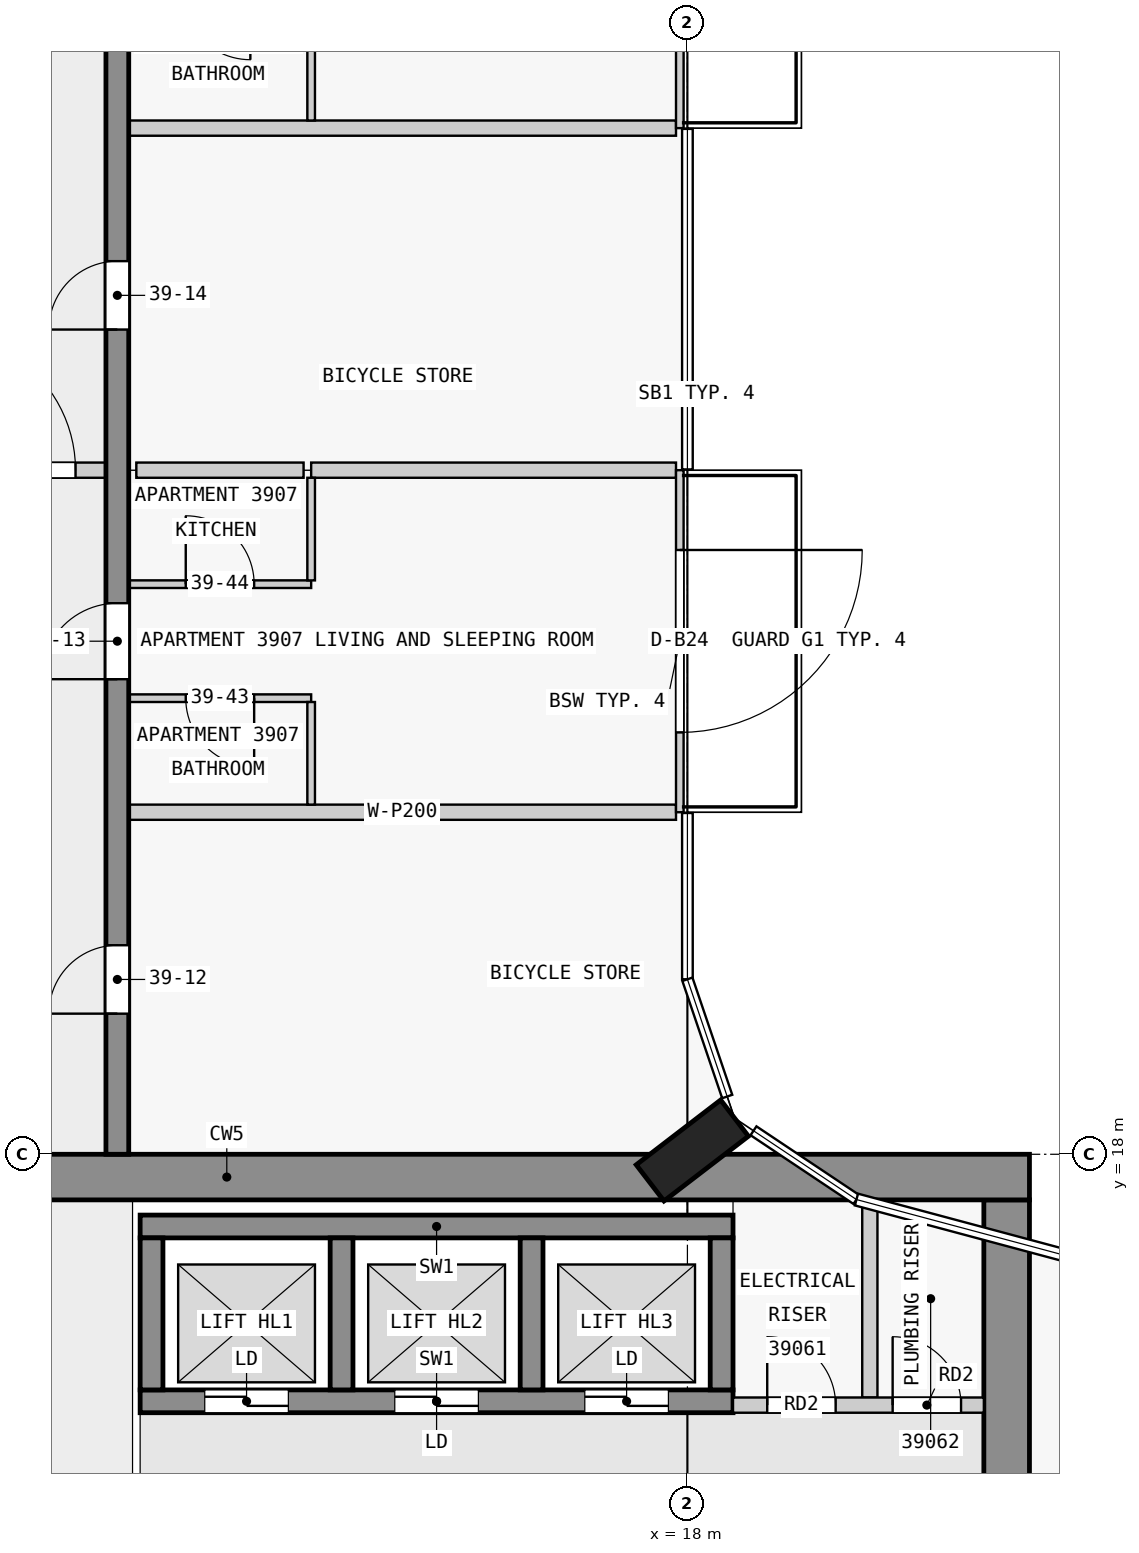
"""IFC4 building model, lengths in metres.
Left out: names, types, materials, properties, quantities, classifications, styles, units other than length and angle.
Written with IfcOpenShell. Run it as: python <this file> out.ifc"""

import sys

from ifc_helpers import new_model, si_unit, direction, frame, frame_2d, origin, origin_2d, place, context, subcontext, project, spatial, rectangle, extrude, element, fill, save


model = new_model("IFC4")
c1 = context("Model", 3, precision=1e-05, world=origin(), true_north=direction((0.0, 1.0)))
c2 = subcontext(c1, "Body", "Model", "MODEL_VIEW")
j1 = project(units=[si_unit("LENGTHUNIT", "METRE"), si_unit("PLANEANGLEUNIT", "RADIAN")], contexts=[c1])
p1 = place(None, origin())
s1 = spatial("IfcSite", under=j1, at=p1, CompositionType="ELEMENT")
p2 = place(p1, origin())
s2 = spatial("IfcBuilding", under=s1, at=p2, CompositionType="ELEMENT")
p3 = place(p2, frame((0.0, 0.0, 153.4)))
s3 = spatial("IfcBuildingStorey", under=s2, at=p3, CompositionType="ELEMENT", Elevation=153.4)
p4 = place(p3, frame((18.065, 18.05, 0.0), z_axis=(0.0, 0.0, 1.0), x_axis=(-0.608810846443, 0.793315418515, 0.0)))
e1 = element("IfcColumn", 1, at=p4, inside=s3, PredefinedType="COLUMN", context=c2, shape_type="SweptSolid", body=[
    extrude(rectangle(XDim=0.6, YDim=1.4, at=origin_2d()), origin(), (0.0, 0.0, 1.0), 3.5),
])
p5 = place(p3, frame((1.38, 17.7, 0.0), z_axis=(0.0, 0.0, 1.0), x_axis=(1.0, 0.0, 0.0)))
e2 = element("IfcWall", 2, at=p5, inside=s3, PredefinedType="SHEAR", context=c2, shape_type="SweptSolid", body=[
    extrude(rectangle(XDim=21.12, YDim=0.6, at=frame_2d((10.56, 0.0))), origin(), (0.0, 0.0, 1.0), 3.25),
])
p6 = place(p5, frame((6.4, 0.0, 0.0)))
e3 = element("IfcOpeningElement", 3, at=p6, cuts=e2, PredefinedType="OPENING", context=c2, shape_type="SweptSolid", body=[
    extrude(rectangle(XDim=1.8, YDim=2.1, at=frame_2d((0.9, 1.05))), frame((0.0, 0.31, 0.0), z_axis=(0.0, -1.0, 0.0), x_axis=(1.0, 0.0, 0.0)), (0.0, 0.0, 1.0), 0.62),
])
p7 = place(p3, frame((22.2, 2.5, 0.0), z_axis=(0.0, 0.0, 1.0), x_axis=(0.0, 1.0, 0.0)))
e4 = element("IfcWall", 4, at=p7, inside=s3, PredefinedType="SHEAR", context=c2, shape_type="SweptSolid", body=[
    extrude(rectangle(XDim=14.9, YDim=0.6, at=frame_2d((7.45, 0.0))), origin(), (0.0, 0.0, 1.0), 3.25),
])
p8 = place(p7, frame((5.6, 0.0, 0.0)))
e5 = element("IfcOpeningElement", 5, at=p8, cuts=e4, PredefinedType="OPENING", context=c2, shape_type="SweptSolid", body=[
    extrude(rectangle(XDim=1.8, YDim=2.1, at=frame_2d((0.9, 1.05))), frame((0.0, 0.31, 0.0), z_axis=(0.0, -1.0, 0.0), x_axis=(1.0, 0.0, 0.0)), (0.0, 0.0, 1.0), 0.62),
])
p9 = place(p3, frame((10.8, 17.05, 0.0), z_axis=(0.0, 0.0, 1.0), x_axis=(1.0, 0.0, 0.0)))
e6 = element("IfcWall", 6, at=p9, inside=s3, PredefinedType="SHEAR", context=c2, shape_type="SweptSolid", body=[
    extrude(rectangle(XDim=7.8, YDim=0.3, at=frame_2d((3.9, 0.0))), origin(), (0.0, 0.0, 1.0), 3.25),
])
p10 = place(p3, frame((10.8, 14.75, 0.0), z_axis=(0.0, 0.0, 1.0), x_axis=(1.0, 0.0, 0.0)))
e7 = element("IfcWall", 7, at=p10, inside=s3, PredefinedType="SHEAR", context=c2, shape_type="SweptSolid", body=[
    extrude(rectangle(XDim=7.8, YDim=0.3, at=frame_2d((3.9, 0.0))), origin(), (0.0, 0.0, 1.0), 3.25),
])
p11 = place(p10, frame((0.85, 0.0, 0.0)))
e8 = element("IfcOpeningElement", 8, at=p11, cuts=e7, PredefinedType="OPENING", context=c2, shape_type="SweptSolid", body=[
    extrude(rectangle(XDim=1.1, YDim=2.1, at=frame_2d((0.55, 1.05))), frame((0.0, 0.16, 0.0), z_axis=(0.0, -1.0, 0.0), x_axis=(1.0, 0.0, 0.0)), (0.0, 0.0, 1.0), 0.32),
])
p12 = place(p10, frame((3.35, 0.0, 0.0)))
e9 = element("IfcOpeningElement", 9, at=p12, cuts=e7, PredefinedType="OPENING", context=c2, shape_type="SweptSolid", body=[
    extrude(rectangle(XDim=1.1, YDim=2.1, at=frame_2d((0.55, 1.05))), frame((0.0, 0.16, 0.0), z_axis=(0.0, -1.0, 0.0), x_axis=(1.0, 0.0, 0.0)), (0.0, 0.0, 1.0), 0.32),
])
p13 = place(p10, frame((5.85, 0.0, 0.0)))
e10 = element("IfcOpeningElement", 10, at=p13, cuts=e7, PredefinedType="OPENING", context=c2, shape_type="SweptSolid", body=[
    extrude(rectangle(XDim=1.1, YDim=2.1, at=frame_2d((0.55, 1.05))), frame((0.0, 0.16, 0.0), z_axis=(0.0, -1.0, 0.0), x_axis=(1.0, 0.0, 0.0)), (0.0, 0.0, 1.0), 0.32),
])
for number, where, z_axis, x_axis in (
    (11, (10.95, 14.9, 0.0), (0.0, 0.0, 1.0), (0.0, 1.0, 0.0)),
    (12, (13.45, 14.9, 0.0), (0.0, 0.0, 1.0), (0.0, 1.0, 0.0)),
    (13, (15.95, 14.9, 0.0), (0.0, 0.0, 1.0), (0.0, 1.0, 0.0)),
    (14, (18.45, 14.9, 0.0), (0.0, 0.0, 1.0), (0.0, 1.0, 0.0)),
):
    element("IfcWall", number, at=place(p3, frame(where, z_axis=z_axis, x_axis=x_axis)), inside=s3, PredefinedType="SHEAR", context=c2, shape_type="SweptSolid", body=[
        extrude(rectangle(XDim=2.0, YDim=0.3, at=frame_2d((1.0, 0.0))), origin(), (0.0, 0.0, 1.0), 3.25),
    ])
p14 = place(p3, frame((10.5, 18.0, 0.0), z_axis=(0.0, 0.0, 1.0), x_axis=(0.0, 1.0, 0.0)))
e15 = element("IfcWall", 15, at=p14, inside=s3, PredefinedType="SHEAR", context=c2, shape_type="SweptSolid", body=[
    extrude(rectangle(XDim=27.0, YDim=0.3, at=frame_2d((13.5, 0.0))), origin(), (0.0, 0.0, 1.0), 3.25),
])
p15 = place(p14, frame((1.85, 0.0, 0.0)))
e16 = element("IfcOpeningElement", 16, at=p15, cuts=e15, PredefinedType="OPENING", context=c2, shape_type="SweptSolid", body=[
    extrude(rectangle(XDim=0.9, YDim=2.1, at=frame_2d((0.45, 1.05))), frame((0.0, 0.16, 0.0), z_axis=(0.0, -1.0, 0.0), x_axis=(1.0, 0.0, 0.0)), (0.0, 0.0, 1.0), 0.32),
])
p16 = place(p14, frame((6.25, 0.0, 0.0)))
e17 = element("IfcOpeningElement", 17, at=p16, cuts=e15, PredefinedType="OPENING", context=c2, shape_type="SweptSolid", body=[
    extrude(rectangle(XDim=1.0, YDim=2.1, at=frame_2d((0.5, 1.05))), frame((0.0, 0.16, 0.0), z_axis=(0.0, -1.0, 0.0), x_axis=(1.0, 0.0, 0.0)), (0.0, 0.0, 1.0), 0.32),
])
p17 = place(p14, frame((10.85, 0.0, 0.0)))
e18 = element("IfcOpeningElement", 18, at=p17, cuts=e15, PredefinedType="OPENING", context=c2, shape_type="SweptSolid", body=[
    extrude(rectangle(XDim=0.9, YDim=2.1, at=frame_2d((0.45, 1.05))), frame((0.0, 0.16, 0.0), z_axis=(0.0, -1.0, 0.0), x_axis=(1.0, 0.0, 0.0)), (0.0, 0.0, 1.0), 0.32),
])
p18 = place(p14, frame((17.55, 0.0, 0.0)))
e19 = element("IfcOpeningElement", 19, at=p18, cuts=e15, PredefinedType="OPENING", context=c2, shape_type="SweptSolid", body=[
    extrude(rectangle(XDim=1.0, YDim=2.1, at=frame_2d((0.5, 1.05))), frame((0.0, 0.16, 0.0), z_axis=(0.0, -1.0, 0.0), x_axis=(1.0, 0.0, 0.0)), (0.0, 0.0, 1.0), 0.32),
])
p19 = place(p14, frame((23.25, 0.0, 0.0)))
e20 = element("IfcOpeningElement", 20, at=p19, cuts=e15, PredefinedType="OPENING", context=c2, shape_type="SweptSolid", body=[
    extrude(rectangle(XDim=0.9, YDim=2.1, at=frame_2d((0.45, 1.05))), frame((0.0, 0.16, 0.0), z_axis=(0.0, -1.0, 0.0), x_axis=(1.0, 0.0, 0.0)), (0.0, 0.0, 1.0), 0.32),
])
p20 = place(p14, frame((25.45, 0.0, 0.0)))
e21 = element("IfcOpeningElement", 21, at=p20, cuts=e15, PredefinedType="OPENING", context=c2, shape_type="SweptSolid", body=[
    extrude(rectangle(XDim=1.0, YDim=2.1, at=frame_2d((0.5, 1.05))), frame((0.0, 0.16, 0.0), z_axis=(0.0, -1.0, 0.0), x_axis=(1.0, 0.0, 0.0)), (0.0, 0.0, 1.0), 0.32),
])
p21 = place(p3, frame((17.9, 27.0, 0.0), z_axis=(0.0, 0.0, 1.0), x_axis=(0.0, -1.0, 0.0)))
e22 = element("IfcWall", 22, at=p21, inside=s3, PredefinedType="STANDARD", context=c2, shape_type="SweptSolid", body=[
    extrude(rectangle(XDim=4.5, YDim=0.1, at=frame_2d((2.25, 0.0))), origin(), (0.0, 0.0, 1.0), 3.25),
])
p22 = place(p21, frame((1.05, 0.0, 0.0)))
e23 = element("IfcOpeningElement", 23, at=p22, cuts=e22, PredefinedType="OPENING", context=c2, shape_type="SweptSolid", body=[
    extrude(rectangle(XDim=2.4, YDim=2.4, at=frame_2d((1.2, 1.2))), frame((0.0, 0.06, 0.0), z_axis=(0.0, -1.0, 0.0), x_axis=(1.0, 0.0, 0.0)), (0.0, 0.0, 1.0), 0.12),
])
p23 = place(p3, frame((17.9, 36.0, 0.0), z_axis=(0.0, 0.0, 1.0), x_axis=(0.0, -1.0, 0.0)))
e24 = element("IfcWall", 24, at=p23, inside=s3, PredefinedType="STANDARD", context=c2, shape_type="SweptSolid", body=[
    extrude(rectangle(XDim=4.5, YDim=0.1, at=frame_2d((2.25, 0.0))), origin(), (0.0, 0.0, 1.0), 3.25),
])
p24 = place(p23, frame((1.05, 0.0, 0.0)))
e25 = element("IfcOpeningElement", 25, at=p24, cuts=e24, PredefinedType="OPENING", context=c2, shape_type="SweptSolid", body=[
    extrude(rectangle(XDim=2.4, YDim=2.4, at=frame_2d((1.2, 1.2))), frame((0.0, 0.06, 0.0), z_axis=(0.0, -1.0, 0.0), x_axis=(1.0, 0.0, 0.0)), (0.0, 0.0, 1.0), 0.12),
])
p25 = place(p3, frame((18.6, 14.7, 0.0), z_axis=(0.0, 0.0, 1.0), x_axis=(1.0, 0.0, 0.0)))
e26 = element("IfcWall", 26, at=p25, inside=s3, PredefinedType="PARTITIONING", context=c2, shape_type="SweptSolid", body=[
    extrude(rectangle(XDim=3.3, YDim=0.2, at=frame_2d((1.65, 0.0))), origin(), (0.0, 0.0, 1.0), 3.25),
])
p26 = place(p25, frame((0.45, 0.0, 0.0)))
e27 = element("IfcOpeningElement", 27, at=p26, cuts=e26, PredefinedType="OPENING", context=c2, shape_type="SweptSolid", body=[
    extrude(rectangle(XDim=0.9, YDim=2.1, at=frame_2d((0.45, 1.05))), frame((0.0, 0.11, 0.0), z_axis=(0.0, -1.0, 0.0), x_axis=(1.0, 0.0, 0.0)), (0.0, 0.0, 1.0), 0.22),
])
p27 = place(p25, frame((2.1, 0.0, 0.0)))
e28 = element("IfcOpeningElement", 28, at=p27, cuts=e26, PredefinedType="OPENING", context=c2, shape_type="SweptSolid", body=[
    extrude(rectangle(XDim=0.9, YDim=2.1, at=frame_2d((0.45, 1.05))), frame((0.0, 0.11, 0.0), z_axis=(0.0, -1.0, 0.0), x_axis=(1.0, 0.0, 0.0)), (0.0, 0.0, 1.0), 0.22),
])
p28 = place(p3, frame((20.4, 14.8, 0.0), z_axis=(0.0, 0.0, 1.0), x_axis=(0.0, 1.0, 0.0)))
e29 = element("IfcWall", 29, at=p28, inside=s3, PredefinedType="PARTITIONING", context=c2, shape_type="SweptSolid", body=[
    extrude(rectangle(XDim=2.6, YDim=0.2, at=frame_2d((1.3, 0.0))), origin(), (0.0, 0.0, 1.0), 3.25),
])
p29 = place(p3, frame((17.85, 22.5, 0.0), z_axis=(0.0, 0.0, 1.0), x_axis=(-1.0, 0.0, 0.0)))
e30 = element("IfcWall", 30, at=p29, inside=s3, PredefinedType="PARTITIONING", context=c2, shape_type="SweptSolid", body=[
    extrude(rectangle(XDim=7.2, YDim=0.2, at=frame_2d((3.6, 0.0))), origin(), (0.0, 0.0, 1.0), 3.25),
])
p30 = place(p3, frame((13.05, 24.0, 0.0), z_axis=(0.0, 0.0, 1.0), x_axis=(-1.0, 0.0, 0.0)))
e31 = element("IfcWall", 31, at=p30, inside=s3, PredefinedType="PARTITIONING", context=c2, shape_type="SweptSolid", body=[
    extrude(rectangle(XDim=2.4, YDim=0.1, at=frame_2d((1.2, 0.0))), origin(), (0.0, 0.0, 1.0), 3.25),
])
p31 = place(p30, frame((0.75, 0.0, 0.0)))
e32 = element("IfcOpeningElement", 32, at=p31, cuts=e31, PredefinedType="OPENING", context=c2, shape_type="SweptSolid", body=[
    extrude(rectangle(XDim=0.9, YDim=2.1, at=frame_2d((0.45, 1.05))), frame((0.0, 0.06, 0.0), z_axis=(0.0, -1.0, 0.0), x_axis=(1.0, 0.0, 0.0)), (0.0, 0.0, 1.0), 0.12),
])
p32 = place(p3, frame((10.65, 25.5, 0.0), z_axis=(0.0, 0.0, 1.0), x_axis=(1.0, 0.0, 0.0)))
e33 = element("IfcWall", 33, at=p32, inside=s3, PredefinedType="PARTITIONING", context=c2, shape_type="SweptSolid", body=[
    extrude(rectangle(XDim=2.4, YDim=0.1, at=frame_2d((1.2, 0.0))), origin(), (0.0, 0.0, 1.0), 3.25),
])
p33 = place(p32, frame((0.75, 0.0, 0.0)))
e34 = element("IfcOpeningElement", 34, at=p33, cuts=e33, PredefinedType="OPENING", context=c2, shape_type="SweptSolid", body=[
    extrude(rectangle(XDim=0.9, YDim=2.1, at=frame_2d((0.45, 1.05))), frame((0.0, 0.06, 0.0), z_axis=(0.0, -1.0, 0.0), x_axis=(1.0, 0.0, 0.0)), (0.0, 0.0, 1.0), 0.12),
])
p34 = place(p3, frame((12.95, 27.0, 0.0), z_axis=(0.0, 0.0, 1.0), x_axis=(-1.0, 0.0, 0.0)))
e35 = element("IfcWall", 35, at=p34, inside=s3, PredefinedType="PARTITIONING", context=c2, shape_type="SweptSolid", body=[
    extrude(rectangle(XDim=2.2, YDim=0.2, at=frame_2d((1.1, 0.0))), origin(), (0.0, 0.0, 1.0), 3.25),
])
p35 = place(p3, frame((13.05, 27.0, 0.0), z_axis=(0.0, 0.0, 1.0), x_axis=(1.0, 0.0, 0.0)))
e36 = element("IfcWall", 36, at=p35, inside=s3, PredefinedType="PARTITIONING", context=c2, shape_type="SweptSolid", body=[
    extrude(rectangle(XDim=4.8, YDim=0.2, at=frame_2d((2.4, 0.0))), origin(), (0.0, 0.0, 1.0), 3.25),
])
p36 = place(p3, frame((17.85, 31.5, 0.0), z_axis=(0.0, 0.0, 1.0), x_axis=(-1.0, 0.0, 0.0)))
e37 = element("IfcWall", 37, at=p36, inside=s3, PredefinedType="PARTITIONING", context=c2, shape_type="SweptSolid", body=[
    extrude(rectangle(XDim=7.2, YDim=0.2, at=frame_2d((3.6, 0.0))), origin(), (0.0, 0.0, 1.0), 3.25),
])
for number, where, z_axis, x_axis in (
    (38, (13.05, 22.6, 0.0), (0.0, 0.0, 1.0), (0.0, 1.0, 0.0)),
    (39, (13.05, 25.55, 0.0), (0.0, 0.0, 1.0), (0.0, 1.0, 0.0)),
):
    element("IfcWall", number, at=place(p3, frame(where, z_axis=z_axis, x_axis=x_axis)), inside=s3, PredefinedType="PARTITIONING", context=c2, shape_type="SweptSolid", body=[
        extrude(rectangle(XDim=1.35, YDim=0.1, at=frame_2d((0.675, 0.0))), origin(), (0.0, 0.0, 1.0), 3.25),
    ])
p37 = place(p3, frame((13.05, 31.6, 0.0), z_axis=(0.0, 0.0, 1.0), x_axis=(0.0, 1.0, 0.0)))
e40 = element("IfcWall", 40, at=p37, inside=s3, PredefinedType="PARTITIONING", context=c2, shape_type="SweptSolid", body=[
    extrude(rectangle(XDim=1.65, YDim=0.1, at=frame_2d((0.825, 0.0))), origin(), (0.0, 0.0, 1.0), 3.25),
])
p38 = place(p3, frame((7.45, 27.0, 0.0), z_axis=(0.0, 0.0, 1.0), x_axis=(1.0, 0.0, 0.0)))
e41 = element("IfcWall", 41, at=p38, inside=s3, PredefinedType="PARTITIONING", context=c2, shape_type="SweptSolid", body=[
    extrude(rectangle(XDim=3.2, YDim=0.2, at=frame_2d((1.6, 0.0))), origin(), (0.0, 0.0, 1.0), 3.25),
])
p39 = place(p38, frame((0.7, 0.0, 0.0)))
e42 = element("IfcOpeningElement", 42, at=p39, cuts=e41, PredefinedType="OPENING", context=c2, shape_type="SweptSolid", body=[
    extrude(rectangle(XDim=1.8, YDim=2.1, at=frame_2d((0.9, 1.05))), frame((0.0, 0.11, 0.0), z_axis=(0.0, -1.0, 0.0), x_axis=(1.0, 0.0, 0.0)), (0.0, 0.0, 1.0), 0.22),
])
p40 = place(p22, origin())
e43 = element("IfcDoor", 43, at=p40, inside=s3, OperationType="SINGLE_SWING_LEFT", PredefinedType="DOOR", context=c2, shape_type="SweptSolid", body=[
    extrude(rectangle(XDim=2.4, YDim=2.4, at=frame_2d((1.2, 1.2))), frame((0.0, 0.025, 0.0), z_axis=(0.0, -1.0, 0.0), x_axis=(1.0, 0.0, 0.0)), (0.0, 0.0, 1.0), 0.05),
])
fill(e23, e43)
p41 = place(p11, origin())
e44 = element("IfcDoor", 44, at=p41, inside=s3, OperationType="DOUBLE_DOOR_SLIDING", PredefinedType="DOOR", context=c2, shape_type="SweptSolid", body=[
    extrude(rectangle(XDim=1.1, YDim=2.1, at=frame_2d((0.55, 1.05))), frame((0.0, 0.025, 0.0), z_axis=(0.0, -1.0, 0.0), x_axis=(1.0, 0.0, 0.0)), (0.0, 0.0, 1.0), 0.05),
])
fill(e8, e44)
p42 = place(p12, origin())
e45 = element("IfcDoor", 45, at=p42, inside=s3, OperationType="DOUBLE_DOOR_SLIDING", PredefinedType="DOOR", context=c2, shape_type="SweptSolid", body=[
    extrude(rectangle(XDim=1.1, YDim=2.1, at=frame_2d((0.55, 1.05))), frame((0.0, 0.025, 0.0), z_axis=(0.0, -1.0, 0.0), x_axis=(1.0, 0.0, 0.0)), (0.0, 0.0, 1.0), 0.05),
])
fill(e9, e45)
p43 = place(p13, origin())
e46 = element("IfcDoor", 46, at=p43, inside=s3, OperationType="DOUBLE_DOOR_SLIDING", PredefinedType="DOOR", context=c2, shape_type="SweptSolid", body=[
    extrude(rectangle(XDim=1.1, YDim=2.1, at=frame_2d((0.55, 1.05))), frame((0.0, 0.025, 0.0), z_axis=(0.0, -1.0, 0.0), x_axis=(1.0, 0.0, 0.0)), (0.0, 0.0, 1.0), 0.05),
])
fill(e10, e46)
p44 = place(p26, origin())
e47 = element("IfcDoor", 47, at=p44, inside=s3, OperationType="SINGLE_SWING_LEFT", PredefinedType="DOOR", context=c2, shape_type="SweptSolid", body=[
    extrude(rectangle(XDim=0.9, YDim=2.1, at=frame_2d((0.45, 1.05))), frame((0.0, 0.025, 0.0), z_axis=(0.0, -1.0, 0.0), x_axis=(1.0, 0.0, 0.0)), (0.0, 0.0, 1.0), 0.05),
])
fill(e27, e47)
p45 = place(p27, origin())
e48 = element("IfcDoor", 48, at=p45, inside=s3, OperationType="SINGLE_SWING_LEFT", PredefinedType="DOOR", context=c2, shape_type="SweptSolid", body=[
    extrude(rectangle(XDim=0.9, YDim=2.1, at=frame_2d((0.45, 1.05))), frame((0.0, 0.025, 0.0), z_axis=(0.0, -1.0, 0.0), x_axis=(1.0, 0.0, 0.0)), (0.0, 0.0, 1.0), 0.05),
])
fill(e28, e48)
p46 = place(p15, origin())
e49 = element("IfcDoor", 49, at=p46, inside=s3, OperationType="SINGLE_SWING_LEFT", PredefinedType="DOOR", context=c2, shape_type="SweptSolid", body=[
    extrude(rectangle(XDim=0.9, YDim=2.1, at=frame_2d((0.45, 1.05))), frame((0.0, 0.025, 0.0), z_axis=(0.0, -1.0, 0.0), x_axis=(1.0, 0.0, 0.0)), (0.0, 0.0, 1.0), 0.05),
])
fill(e16, e49)
p47 = place(p16, origin())
e50 = element("IfcDoor", 50, at=p47, inside=s3, OperationType="SINGLE_SWING_LEFT", PredefinedType="DOOR", context=c2, shape_type="SweptSolid", body=[
    extrude(rectangle(XDim=1.0, YDim=2.1, at=frame_2d((0.5, 1.05))), frame((0.0, 0.025, 0.0), z_axis=(0.0, -1.0, 0.0), x_axis=(1.0, 0.0, 0.0)), (0.0, 0.0, 1.0), 0.05),
])
fill(e17, e50)
p48 = place(p17, origin())
e51 = element("IfcDoor", 51, at=p48, inside=s3, OperationType="SINGLE_SWING_LEFT", PredefinedType="DOOR", context=c2, shape_type="SweptSolid", body=[
    extrude(rectangle(XDim=0.9, YDim=2.1, at=frame_2d((0.45, 1.05))), frame((0.0, 0.025, 0.0), z_axis=(0.0, -1.0, 0.0), x_axis=(1.0, 0.0, 0.0)), (0.0, 0.0, 1.0), 0.05),
])
fill(e18, e51)
p49 = place(p39, origin())
e52 = element("IfcDoor", 52, at=p49, inside=s3, OperationType="SINGLE_SWING_LEFT", PredefinedType="DOOR", context=c2, shape_type="SweptSolid", body=[
    extrude(rectangle(XDim=1.8, YDim=2.1, at=frame_2d((0.9, 1.05))), frame((0.0, 0.025, 0.0), z_axis=(0.0, -1.0, 0.0), x_axis=(1.0, 0.0, 0.0)), (0.0, 0.0, 1.0), 0.05),
])
fill(e42, e52)
p50 = place(p31, origin())
e53 = element("IfcDoor", 53, at=p50, inside=s3, OperationType="SINGLE_SWING_LEFT", PredefinedType="DOOR", context=c2, shape_type="SweptSolid", body=[
    extrude(rectangle(XDim=0.9, YDim=2.1, at=frame_2d((0.45, 1.05))), frame((0.0, 0.025, 0.0), z_axis=(0.0, -1.0, 0.0), x_axis=(1.0, 0.0, 0.0)), (0.0, 0.0, 1.0), 0.05),
])
fill(e32, e53)
p51 = place(p33, origin())
e54 = element("IfcDoor", 54, at=p51, inside=s3, OperationType="SINGLE_SWING_LEFT", PredefinedType="DOOR", context=c2, shape_type="SweptSolid", body=[
    extrude(rectangle(XDim=0.9, YDim=2.1, at=frame_2d((0.45, 1.05))), frame((0.0, 0.025, 0.0), z_axis=(0.0, -1.0, 0.0), x_axis=(1.0, 0.0, 0.0)), (0.0, 0.0, 1.0), 0.05),
])
fill(e34, e54)
save(model, sys.argv[1])
